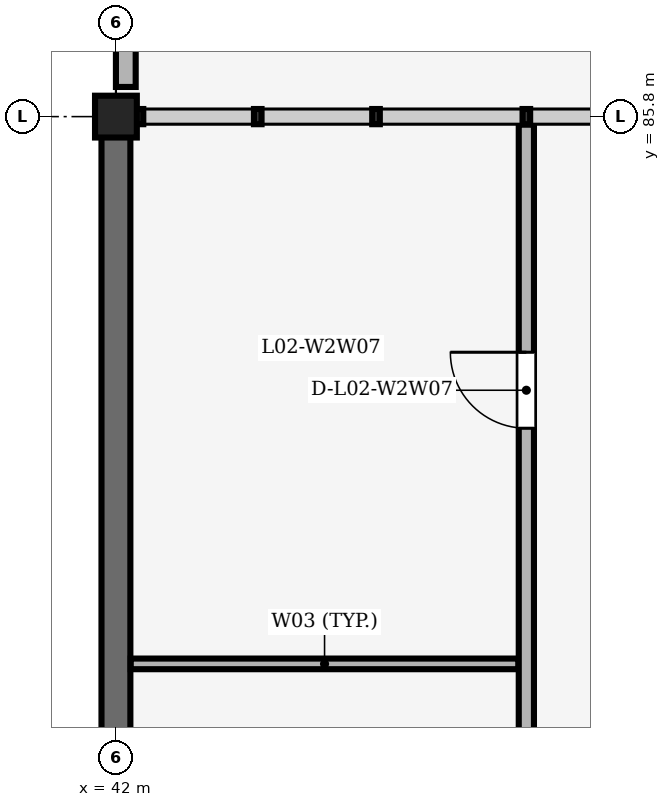
"""IFC4 building model, lengths in metres.
Left out: names, types, materials, properties, quantities, classifications, styles, units other than length and angle.
Written with IfcOpenShell. Run it as: python <this file> out.ifc"""

import sys

from ifc_helpers import new_model, si_unit, direction, frame, frame_2d, origin, origin_2d, place, context, subcontext, project, spatial, rectangle, extrude, element, fill, save


model = new_model("IFC4")
c1 = context("Model", 3, precision=1e-05, world=origin(), true_north=direction((0.0, 1.0)))
c2 = subcontext(c1, "Body", "Model", "MODEL_VIEW")
j1 = project(units=[si_unit("LENGTHUNIT", "METRE"), si_unit("PLANEANGLEUNIT", "RADIAN")], contexts=[c1])
p1 = place(None, origin())
s1 = spatial("IfcSite", under=j1, at=p1, CompositionType="ELEMENT")
p2 = place(p1, origin())
s2 = spatial("IfcBuilding", under=s1, at=p2, CompositionType="ELEMENT")
p3 = place(p2, frame((0.0, 0.0, 9.0)))
s3 = spatial("IfcBuildingStorey", under=s2, at=p3, CompositionType="ELEMENT", Elevation=9.0)
p4 = place(p3, frame((42.0, 85.8, 0.0), z_axis=(0.0, 0.0, 1.0), x_axis=(1.0, 0.0, 0.0)))
e1 = element("IfcColumn", 1, at=p4, inside=s3, PredefinedType="COLUMN", context=c2, shape_type="SweptSolid", body=[
    extrude(rectangle(XDim=0.55, YDim=0.55, at=origin_2d()), origin(), (0.0, 0.0, 1.0), 4.2),
])
p5 = place(p3, frame((42.0, 77.65, 0.0), z_axis=(0.0, 0.0, 1.0), x_axis=(0.0, 1.0, 0.0)))
e2 = element("IfcWall", 2, at=p5, inside=s3, PredefinedType="SHEAR", context=c2, shape_type="SweptSolid", body=[
    extrude(rectangle(XDim=7.9, YDim=0.38, at=frame_2d((3.95, 0.0))), origin(), (0.0, 0.0, 1.0), 3.36),
])
p6 = place(p3, frame((42.13, 86.19, 0.0), z_axis=(0.0, 0.0, 1.0), x_axis=(0.0, 1.0, 0.0)))
e3 = element("IfcWall", 3, at=p6, inside=s3, PredefinedType="PARAPET", context=c2, shape_type="SweptSolid", body=[
    extrude(rectangle(XDim=8.22, YDim=0.26, at=frame_2d((4.11, 0.0))), origin(), (0.0, 0.0, 1.0), 0.85),
])
p7 = place(p3, frame((42.195, 78.6, 0.0), z_axis=(0.0, 0.0, 1.0), x_axis=(1.0, 0.0, 0.0)))
e4 = element("IfcWall", 4, at=p7, inside=s3, PredefinedType="PARTITIONING", context=c2, shape_type="SweptSolid", body=[
    extrude(rectangle(XDim=5.1, YDim=0.14, at=frame_2d((2.55, 0.0))), origin(), (0.0, 0.0, 1.0), 3.9),
])
p8 = place(p3, frame((47.4, 35.565, 0.0), z_axis=(0.0, 0.0, 1.0), x_axis=(0.0, 1.0, 0.0)))
e5 = element("IfcWall", 5, at=p8, inside=s3, PredefinedType="PARTITIONING", context=c2, shape_type="SweptSolid", body=[
    extrude(rectangle(XDim=50.13, YDim=0.2, at=frame_2d((25.065, 0.0))), origin(), (0.0, 0.0, 1.0), 3.9),
])
p9 = place(p8, frame((4.135, 0.0, 0.0)))
e6 = element("IfcOpeningElement", 6, at=p9, cuts=e5, PredefinedType="OPENING", context=c2, shape_type="SweptSolid", body=[
    extrude(rectangle(XDim=1.0, YDim=2.15, at=frame_2d((0.5, 1.075))), frame((0.0, 0.11, 0.0), z_axis=(0.0, -1.0, 0.0), x_axis=(1.0, 0.0, 0.0)), (0.0, 0.0, 1.0), 0.22),
])
p10 = place(p8, frame((13.735, 0.0, 0.0)))
e7 = element("IfcOpeningElement", 7, at=p10, cuts=e5, PredefinedType="OPENING", context=c2, shape_type="SweptSolid", body=[
    extrude(rectangle(XDim=1.0, YDim=2.15, at=frame_2d((0.5, 1.075))), frame((0.0, 0.11, 0.0), z_axis=(0.0, -1.0, 0.0), x_axis=(1.0, 0.0, 0.0)), (0.0, 0.0, 1.0), 0.22),
])
p11 = place(p8, frame((21.36, 0.0, 0.0)))
e8 = element("IfcOpeningElement", 8, at=p11, cuts=e5, PredefinedType="OPENING", context=c2, shape_type="SweptSolid", body=[
    extrude(rectangle(XDim=0.95, YDim=2.2, at=frame_2d((0.475, 1.1))), frame((0.0, 0.11, 0.0), z_axis=(0.0, -1.0, 0.0), x_axis=(1.0, 0.0, 0.0)), (0.0, 0.0, 1.0), 0.22),
])
p12 = place(p8, frame((26.96, 0.0, 0.0)))
e9 = element("IfcOpeningElement", 9, at=p12, cuts=e5, PredefinedType="OPENING", context=c2, shape_type="SweptSolid", body=[
    extrude(rectangle(XDim=0.95, YDim=2.2, at=frame_2d((0.475, 1.1))), frame((0.0, 0.11, 0.0), z_axis=(0.0, -1.0, 0.0), x_axis=(1.0, 0.0, 0.0)), (0.0, 0.0, 1.0), 0.22),
])
p13 = place(p8, frame((32.56, 0.0, 0.0)))
e10 = element("IfcOpeningElement", 10, at=p13, cuts=e5, PredefinedType="OPENING", context=c2, shape_type="SweptSolid", body=[
    extrude(rectangle(XDim=0.95, YDim=2.1, at=frame_2d((0.475, 1.05))), frame((0.0, 0.11, 0.0), z_axis=(0.0, -1.0, 0.0), x_axis=(1.0, 0.0, 0.0)), (0.0, 0.0, 1.0), 0.22),
])
p14 = place(p8, frame((38.935, 0.0, 0.0)))
e11 = element("IfcOpeningElement", 11, at=p14, cuts=e5, PredefinedType="OPENING", context=c2, shape_type="SweptSolid", body=[
    extrude(rectangle(XDim=1.0, YDim=2.15, at=frame_2d((0.5, 1.075))), frame((0.0, 0.11, 0.0), z_axis=(0.0, -1.0, 0.0), x_axis=(1.0, 0.0, 0.0)), (0.0, 0.0, 1.0), 0.22),
])
p15 = place(p8, frame((46.135, 0.0, 0.0)))
e12 = element("IfcOpeningElement", 12, at=p15, cuts=e5, PredefinedType="OPENING", context=c2, shape_type="SweptSolid", body=[
    extrude(rectangle(XDim=1.0, YDim=2.15, at=frame_2d((0.5, 1.075))), frame((0.0, 0.11, 0.0), z_axis=(0.0, -1.0, 0.0), x_axis=(1.0, 0.0, 0.0)), (0.0, 0.0, 1.0), 0.22),
])
p16 = place(p15, origin())
e13 = element("IfcDoor", 13, at=p16, inside=s3, OperationType="SINGLE_SWING_RIGHT", PredefinedType="DOOR", context=c2, shape_type="SweptSolid", body=[
    extrude(rectangle(XDim=1.0, YDim=2.15, at=frame_2d((0.5, 1.075))), frame((0.0, 0.025, 0.0), z_axis=(0.0, -1.0, 0.0), x_axis=(1.0, 0.0, 0.0)), (0.0, 0.0, 1.0), 0.05),
])
fill(e12, e13)
save(model, sys.argv[1])
